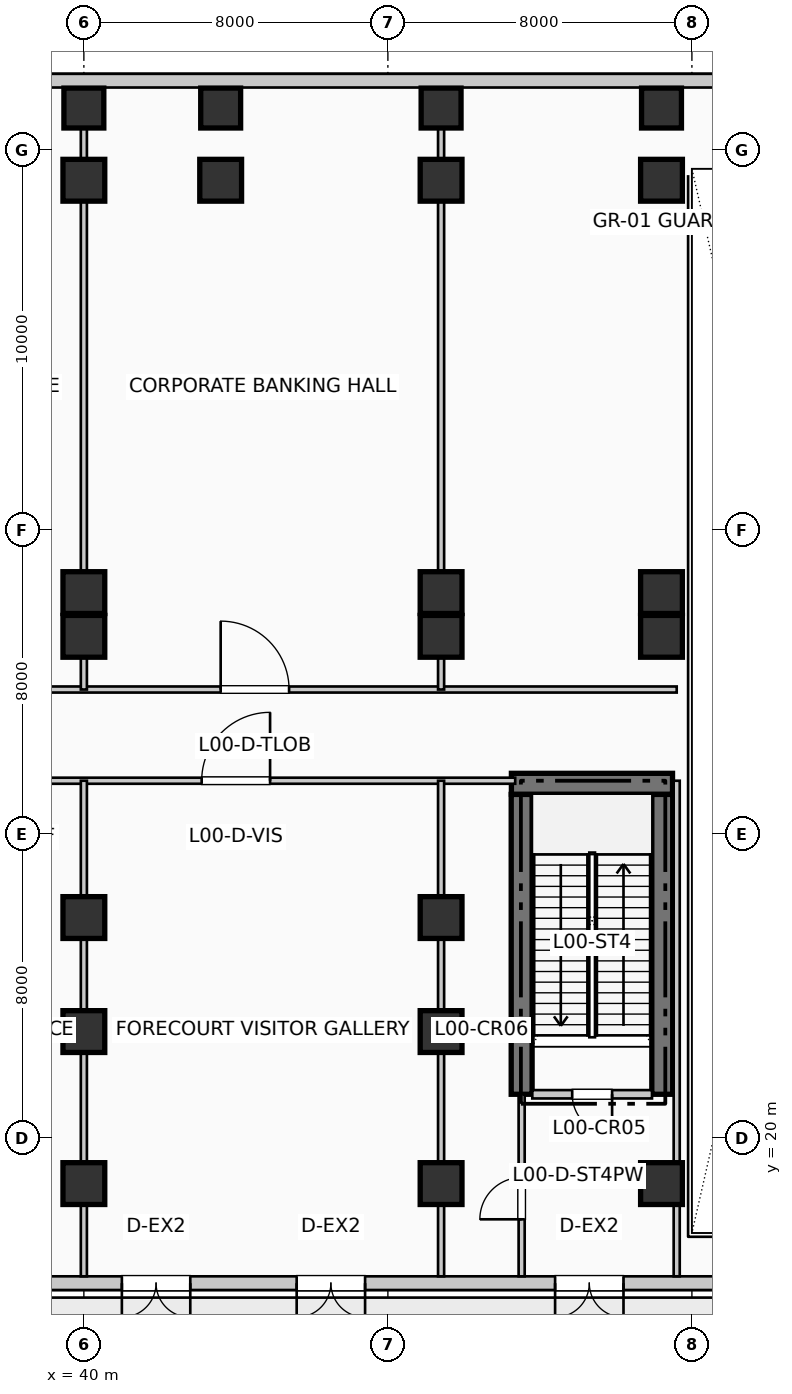
"""IFC4 building model, lengths in metres.
Left out: names, types, materials, properties, quantities, classifications, styles, units other than length and angle.
Written with IfcOpenShell. Run it as: python <this file> out.ifc"""

import sys

from ifc_helpers import new_model, si_unit, direction, frame, frame_2d, origin, origin_2d, place, context, subcontext, project, spatial, rectangle, extrude, element, fill, save


model = new_model("IFC4")
c1 = context("Model", 3, precision=1e-05, world=origin(), true_north=direction((0.0, 1.0)))
c2 = subcontext(c1, "Body", "Model", "MODEL_VIEW")
j1 = project(units=[si_unit("LENGTHUNIT", "METRE"), si_unit("PLANEANGLEUNIT", "RADIAN")], contexts=[c1])
p1 = place(None, origin())
s1 = spatial("IfcSite", under=j1, at=p1, CompositionType="ELEMENT")
p2 = place(p1, origin())
s2 = spatial("IfcBuilding", under=s1, at=p2, CompositionType="ELEMENT")
p3 = place(p2, origin())
s3 = spatial("IfcBuildingStorey", under=s2, at=p3, CompositionType="ELEMENT", Elevation=0.0)
for number, where, z_axis, x_axis in (
    (1, (51.52, 21.15, 0.0), (0.0, 0.0, 1.0), (0.0, 1.0, 0.0)),
    (2, (55.22, 21.15, 0.0), (0.0, 0.0, 1.0), (0.0, 1.0, 0.0)),
):
    element("IfcWall", number, at=place(p3, frame(where, z_axis=z_axis, x_axis=x_axis)), inside=s3, PredefinedType="SHEAR", context=c2, shape_type="SweptSolid", body=[
        extrude(rectangle(XDim=7.89, YDim=0.55, at=frame_2d((3.945, 0.0))), origin(), (0.0, 0.0, 1.0), 5.94),
    ])
p4 = place(p3, frame((51.25, 29.32, 0.0), z_axis=(0.0, 0.0, 1.0), x_axis=(1.0, 0.0, 0.0)))
e3 = element("IfcWall", 3, at=p4, inside=s3, PredefinedType="SHEAR", context=c2, shape_type="SweptSolid", body=[
    extrude(rectangle(XDim=4.24, YDim=0.55, at=frame_2d((2.12, 0.0))), origin(), (0.0, 0.0, 1.0), 5.94),
])
for number, where, z_axis, x_axis in (
    (4, (40.0, 18.8, 0.0), (0.0, 0.0, 1.0), (1.0, 0.0, 0.0)),
    (5, (40.0, 22.8, 0.0), (0.0, 0.0, 1.0), (1.0, 0.0, 0.0)),
    (6, (40.0, 25.8, 0.0), (0.0, 0.0, 1.0), (1.0, 0.0, 0.0)),
    (7, (40.0, 33.2, 0.0), (0.0, 0.0, 1.0), (1.0, 0.0, 0.0)),
    (8, (40.0, 34.35, 0.0), (0.0, 0.0, 1.0), (1.0, 0.0, 0.0)),
    (9, (40.0, 45.2, 0.0), (0.0, 0.0, 1.0), (1.0, 0.0, 0.0)),
):
    element("IfcColumn", number, at=place(p3, frame(where, z_axis=z_axis, x_axis=x_axis)), inside=s3, PredefinedType="COLUMN", context=c2, shape_type="SweptSolid", body=[
        extrude(rectangle(XDim=1.1, YDim=1.1, at=origin_2d()), origin(), (0.0, 0.0, 1.0), 5.94),
    ])
p5 = place(p3, frame((40.0, 47.1, 0.0), z_axis=(0.0, 0.0, 1.0), x_axis=(1.0, 0.0, 0.0)))
e10 = element("IfcColumn", 10, at=p5, inside=s3, PredefinedType="COLUMN", context=c2, shape_type="SweptSolid", body=[
    extrude(rectangle(XDim=1.05, YDim=1.05, at=origin_2d()), origin(), (0.0, 0.0, 1.0), 5.94),
])
p6 = place(p3, frame((43.6, 45.2, 0.0), z_axis=(0.0, 0.0, 1.0), x_axis=(1.0, 0.0, 0.0)))
e11 = element("IfcColumn", 11, at=p6, inside=s3, PredefinedType="COLUMN", context=c2, shape_type="SweptSolid", body=[
    extrude(rectangle(XDim=1.1, YDim=1.1, at=origin_2d()), origin(), (0.0, 0.0, 1.0), 5.94),
])
p7 = place(p3, frame((43.6, 47.1, 0.0), z_axis=(0.0, 0.0, 1.0), x_axis=(1.0, 0.0, 0.0)))
e12 = element("IfcColumn", 12, at=p7, inside=s3, PredefinedType="COLUMN", context=c2, shape_type="SweptSolid", body=[
    extrude(rectangle(XDim=1.05, YDim=1.05, at=origin_2d()), origin(), (0.0, 0.0, 1.0), 5.94),
])
for number, where, z_axis, x_axis in (
    (13, (49.4, 18.8, 0.0), (0.0, 0.0, 1.0), (1.0, 0.0, 0.0)),
    (14, (49.4, 22.8, 0.0), (0.0, 0.0, 1.0), (1.0, 0.0, 0.0)),
    (15, (49.4, 25.8, 0.0), (0.0, 0.0, 1.0), (1.0, 0.0, 0.0)),
    (16, (49.4, 33.2, 0.0), (0.0, 0.0, 1.0), (1.0, 0.0, 0.0)),
    (17, (49.4, 34.35, 0.0), (0.0, 0.0, 1.0), (1.0, 0.0, 0.0)),
    (18, (49.4, 45.2, 0.0), (0.0, 0.0, 1.0), (1.0, 0.0, 0.0)),
):
    element("IfcColumn", number, at=place(p3, frame(where, z_axis=z_axis, x_axis=x_axis)), inside=s3, PredefinedType="COLUMN", context=c2, shape_type="SweptSolid", body=[
        extrude(rectangle(XDim=1.1, YDim=1.1, at=origin_2d()), origin(), (0.0, 0.0, 1.0), 5.94),
    ])
p8 = place(p3, frame((49.4, 47.1, 0.0), z_axis=(0.0, 0.0, 1.0), x_axis=(1.0, 0.0, 0.0)))
e19 = element("IfcColumn", 19, at=p8, inside=s3, PredefinedType="COLUMN", context=c2, shape_type="SweptSolid", body=[
    extrude(rectangle(XDim=1.05, YDim=1.05, at=origin_2d()), origin(), (0.0, 0.0, 1.0), 5.94),
])
for number, where, z_axis, x_axis in (
    (20, (55.2, 18.8, 0.0), (0.0, 0.0, 1.0), (1.0, 0.0, 0.0)),
    (21, (55.2, 33.2, 0.0), (0.0, 0.0, 1.0), (1.0, 0.0, 0.0)),
    (22, (55.2, 34.35, 0.0), (0.0, 0.0, 1.0), (1.0, 0.0, 0.0)),
    (23, (55.2, 45.2, 0.0), (0.0, 0.0, 1.0), (1.0, 0.0, 0.0)),
):
    element("IfcColumn", number, at=place(p3, frame(where, z_axis=z_axis, x_axis=x_axis)), inside=s3, PredefinedType="COLUMN", context=c2, shape_type="SweptSolid", body=[
        extrude(rectangle(XDim=1.1, YDim=1.1, at=origin_2d()), origin(), (0.0, 0.0, 1.0), 5.94),
    ])
p9 = place(p3, frame((55.2, 47.1, 0.0), z_axis=(0.0, 0.0, 1.0), x_axis=(1.0, 0.0, 0.0)))
e24 = element("IfcColumn", 24, at=p9, inside=s3, PredefinedType="COLUMN", context=c2, shape_type="SweptSolid", body=[
    extrude(rectangle(XDim=1.05, YDim=1.05, at=origin_2d()), origin(), (0.0, 0.0, 1.0), 5.94),
])
p10 = place(p3, frame((38.055, 16.18, 0.0), z_axis=(0.0, 0.0, 1.0), x_axis=(1.0, 0.0, 0.0)))
e25 = element("IfcWall", 25, at=p10, inside=s3, PredefinedType="SOLIDWALL", context=c2, shape_type="SweptSolid", body=[
    extrude(rectangle(XDim=40.89, YDim=0.36, at=frame_2d((20.445, 0.0))), origin(), (0.0, 0.0, 1.0), 5.62),
])
p11 = place(p10, frame((4.745, 0.0, 0.0), z_axis=(0.0, 0.0, 1.0), x_axis=(-1.0, 0.0, 0.0)))
e26 = element("IfcOpeningElement", 26, at=p11, cuts=e25, PredefinedType="OPENING", context=c2, shape_type="SweptSolid", body=[
    extrude(rectangle(XDim=1.8, YDim=2.2, at=frame_2d((0.9, 1.1))), frame((0.0, 0.19, 0.0), z_axis=(0.0, -1.0, 0.0), x_axis=(1.0, 0.0, 0.0)), (0.0, 0.0, 1.0), 0.38),
])
p12 = place(p10, frame((9.345, 0.0, 0.0), z_axis=(0.0, 0.0, 1.0), x_axis=(-1.0, 0.0, 0.0)))
e27 = element("IfcOpeningElement", 27, at=p12, cuts=e25, PredefinedType="OPENING", context=c2, shape_type="SweptSolid", body=[
    extrude(rectangle(XDim=1.8, YDim=2.2, at=frame_2d((0.9, 1.1))), frame((0.0, 0.19, 0.0), z_axis=(0.0, -1.0, 0.0), x_axis=(1.0, 0.0, 0.0)), (0.0, 0.0, 1.0), 0.38),
])
p13 = place(p10, frame((16.145, 0.0, 0.0), z_axis=(0.0, 0.0, 1.0), x_axis=(-1.0, 0.0, 0.0)))
e28 = element("IfcOpeningElement", 28, at=p13, cuts=e25, PredefinedType="OPENING", context=c2, shape_type="SweptSolid", body=[
    extrude(rectangle(XDim=1.8, YDim=2.2, at=frame_2d((0.9, 1.1))), frame((0.0, 0.19, 0.0), z_axis=(0.0, -1.0, 0.0), x_axis=(1.0, 0.0, 0.0)), (0.0, 0.0, 1.0), 0.38),
])
p14 = place(p10, frame((32.0, 0.0, 0.0), z_axis=(0.0, 0.0, 1.0), x_axis=(-1.0, 0.0, 0.0)))
e29 = element("IfcOpeningElement", 29, at=p14, cuts=e25, PredefinedType="OPENING", context=c2, shape_type="SweptSolid", body=[
    extrude(rectangle(XDim=1.8, YDim=2.4, at=frame_2d((0.9, 1.2))), frame((0.0, 0.19, 0.0), z_axis=(0.0, -1.0, 0.0), x_axis=(1.0, 0.0, 0.0)), (0.0, 0.0, 1.0), 0.38),
])
p15 = place(p3, frame((78.945, 47.82, 0.0), z_axis=(0.0, 0.0, 1.0), x_axis=(-1.0, 0.0, 0.0)))
e30 = element("IfcWall", 30, at=p15, inside=s3, PredefinedType="SOLIDWALL", context=c2, shape_type="SweptSolid", body=[
    extrude(rectangle(XDim=77.89, YDim=0.36, at=frame_2d((38.945, 0.0))), origin(), (0.0, 0.0, 1.0), 5.62),
])
p16 = place(p15, frame((22.145, 0.0, 0.0), z_axis=(0.0, 0.0, 1.0), x_axis=(-1.0, 0.0, 0.0)))
e31 = element("IfcOpeningElement", 31, at=p16, cuts=e30, PredefinedType="OPENING", context=c2, shape_type="SweptSolid", body=[
    extrude(rectangle(XDim=4.8, YDim=2.6, at=frame_2d((2.4, 1.3))), frame((0.0, 0.19, 0.0), z_axis=(0.0, -1.0, 0.0), x_axis=(1.0, 0.0, 0.0)), (0.0, 0.0, 1.0), 0.38),
])
p17 = place(p15, frame((11.545, 0.0, 0.0), z_axis=(0.0, 0.0, 1.0), x_axis=(-1.0, 0.0, 0.0)))
e32 = element("IfcOpeningElement", 32, at=p17, cuts=e30, PredefinedType="OPENING", context=c2, shape_type="SweptSolid", body=[
    extrude(rectangle(XDim=4.0, YDim=3.2, at=frame_2d((2.0, 1.6))), frame((0.0, 0.19, 0.0), z_axis=(0.0, -1.0, 0.0), x_axis=(1.0, 0.0, 0.0)), (0.0, 0.0, 1.0), 0.38),
])
p18 = place(p15, frame((52.445, 0.0, 0.0), z_axis=(0.0, 0.0, 1.0), x_axis=(-1.0, 0.0, 0.0)))
e33 = element("IfcOpeningElement", 33, at=p18, cuts=e30, PredefinedType="OPENING", context=c2, shape_type="SweptSolid", body=[
    extrude(rectangle(XDim=1.8, YDim=2.4, at=frame_2d((0.9, 1.2))), frame((0.0, 0.19, 0.0), z_axis=(0.0, -1.0, 0.0), x_axis=(1.0, 0.0, 0.0)), (0.0, 0.0, 1.0), 0.38),
])
p19 = place(p3, frame((51.8, 21.15, 0.0), z_axis=(0.0, 0.0, 1.0), x_axis=(1.0, 0.0, 0.0)))
e34 = element("IfcWall", 34, at=p19, inside=s3, PredefinedType="PARTITIONING", context=c2, shape_type="SweptSolid", body=[
    extrude(rectangle(XDim=3.15, YDim=0.22, at=frame_2d((1.575, 0.0))), origin(), (0.0, 0.0, 1.0), 5.62),
])
p20 = place(p19, frame((2.1, 0.0, 0.0), z_axis=(0.0, 0.0, 1.0), x_axis=(-1.0, 0.0, 0.0)))
e35 = element("IfcOpeningElement", 35, at=p20, cuts=e34, PredefinedType="OPENING", context=c2, shape_type="SweptSolid", body=[
    extrude(rectangle(XDim=1.05, YDim=2.15, at=frame_2d((0.525, 1.075))), frame((0.0, 0.12, 0.0), z_axis=(0.0, -1.0, 0.0), x_axis=(1.0, 0.0, 0.0)), (0.0, 0.0, 1.0), 0.24),
])
p21 = place(p3, frame((51.52, 16.36, 0.0), z_axis=(0.0, 0.0, 1.0), x_axis=(0.0, 1.0, 0.0)))
e36 = element("IfcWall", 36, at=p21, inside=s3, PredefinedType="PARTITIONING", context=c2, shape_type="SweptSolid", body=[
    extrude(rectangle(XDim=4.79, YDim=0.16, at=frame_2d((2.395, 0.0))), origin(), (0.0, 0.0, 1.0), 5.62),
])
p22 = place(p21, frame((1.5, 0.0, 0.0)))
e37 = element("IfcOpeningElement", 37, at=p22, cuts=e36, PredefinedType="OPENING", context=c2, shape_type="SweptSolid", body=[
    extrude(rectangle(XDim=1.1, YDim=2.15, at=frame_2d((0.55, 1.075))), frame((0.0, 0.09, 0.0), z_axis=(0.0, -1.0, 0.0), x_axis=(1.0, 0.0, 0.0)), (0.0, 0.0, 1.0), 0.18),
])
p23 = place(p3, frame((55.6, 16.36, 0.0), z_axis=(0.0, 0.0, 1.0), x_axis=(0.0, 1.0, 0.0)))
e38 = element("IfcWall", 38, at=p23, inside=s3, PredefinedType="PARTITIONING", context=c2, shape_type="SweptSolid", body=[
    extrude(rectangle(XDim=13.04, YDim=0.16, at=frame_2d((6.52, 0.0))), origin(), (0.0, 0.0, 1.0), 4.805),
])
p24 = place(p3, frame((7.6, 29.4, 0.0), z_axis=(0.0, 0.0, 1.0), x_axis=(1.0, 0.0, 0.0)))
e39 = element("IfcWall", 39, at=p24, inside=s3, PredefinedType="PARTITIONING", context=c2, shape_type="SweptSolid", body=[
    extrude(rectangle(XDim=43.75, YDim=0.16, at=frame_2d((21.875, 0.0))), origin(), (0.0, 0.0, 1.0), 5.275),
])
p25 = place(p24, frame((3.5, 0.0, 0.0)))
e40 = element("IfcOpeningElement", 40, at=p25, cuts=e39, PredefinedType="OPENING", context=c2, shape_type="SweptSolid", body=[
    extrude(rectangle(XDim=1.8, YDim=2.3, at=frame_2d((0.9, 1.15))), frame((0.0, 0.09, 0.0), z_axis=(0.0, -1.0, 0.0), x_axis=(1.0, 0.0, 0.0)), (0.0, 0.0, 1.0), 0.18),
])
p26 = place(p24, frame((18.0, 0.0, 0.0)))
e41 = element("IfcOpeningElement", 41, at=p26, cuts=e39, PredefinedType="OPENING", context=c2, shape_type="SweptSolid", body=[
    extrude(rectangle(XDim=1.8, YDim=2.3, at=frame_2d((0.9, 1.15))), frame((0.0, 0.09, 0.0), z_axis=(0.0, -1.0, 0.0), x_axis=(1.0, 0.0, 0.0)), (0.0, 0.0, 1.0), 0.18),
])
p27 = place(p24, frame((29.5, 0.0, 0.0)))
e42 = element("IfcOpeningElement", 42, at=p27, cuts=e39, PredefinedType="OPENING", context=c2, shape_type="SweptSolid", body=[
    extrude(rectangle(XDim=0.95, YDim=2.15, at=frame_2d((0.475, 1.075))), frame((0.0, 0.09, 0.0), z_axis=(0.0, -1.0, 0.0), x_axis=(1.0, 0.0, 0.0)), (0.0, 0.0, 1.0), 0.18),
])
p28 = place(p24, frame((35.5, 0.0, 0.0)))
e43 = element("IfcOpeningElement", 43, at=p28, cuts=e39, PredefinedType="OPENING", context=c2, shape_type="SweptSolid", body=[
    extrude(rectangle(XDim=1.8, YDim=2.3, at=frame_2d((0.9, 1.15))), frame((0.0, 0.09, 0.0), z_axis=(0.0, -1.0, 0.0), x_axis=(1.0, 0.0, 0.0)), (0.0, 0.0, 1.0), 0.18),
])
for number, where, z_axis, x_axis in (
    (44, (40.0, 16.36, 0.0), (0.0, 0.0, 1.0), (0.0, 1.0, 0.0)),
    (45, (49.4, 16.36, 0.0), (0.0, 0.0, 1.0), (0.0, 1.0, 0.0)),
):
    element("IfcWall", number, at=place(p3, frame(where, z_axis=z_axis, x_axis=x_axis)), inside=s3, PredefinedType="PARTITIONING", context=c2, shape_type="SweptSolid", body=[
        extrude(rectangle(XDim=13.04, YDim=0.16, at=frame_2d((6.52, 0.0))), origin(), (0.0, 0.0, 1.0), 4.805),
    ])
p29 = place(p3, frame((23.6, 31.8, 0.0), z_axis=(0.0, 0.0, 1.0), x_axis=(1.0, 0.0, 0.0)))
e46 = element("IfcWall", 46, at=p29, inside=s3, PredefinedType="PARTITIONING", context=c2, shape_type="SweptSolid", body=[
    extrude(rectangle(XDim=32.0, YDim=0.16, at=frame_2d((16.0, 0.0))), origin(), (0.0, 0.0, 1.0), 5.62),
])
p30 = place(p29, frame((3.0, 0.0, 0.0)))
e47 = element("IfcOpeningElement", 47, at=p30, cuts=e46, PredefinedType="OPENING", context=c2, shape_type="SweptSolid", body=[
    extrude(rectangle(XDim=1.8, YDim=2.3, at=frame_2d((0.9, 1.15))), frame((0.0, 0.09, 0.0), z_axis=(0.0, -1.0, 0.0), x_axis=(1.0, 0.0, 0.0)), (0.0, 0.0, 1.0), 0.18),
])
p31 = place(p29, frame((9.5, 0.0, 0.0)))
e48 = element("IfcOpeningElement", 48, at=p31, cuts=e46, PredefinedType="OPENING", context=c2, shape_type="SweptSolid", body=[
    extrude(rectangle(XDim=0.95, YDim=2.15, at=frame_2d((0.475, 1.075))), frame((0.0, 0.09, 0.0), z_axis=(0.0, -1.0, 0.0), x_axis=(1.0, 0.0, 0.0)), (0.0, 0.0, 1.0), 0.18),
])
p32 = place(p29, frame((20.0, 0.0, 0.0)))
e49 = element("IfcOpeningElement", 49, at=p32, cuts=e46, PredefinedType="OPENING", context=c2, shape_type="SweptSolid", body=[
    extrude(rectangle(XDim=1.8, YDim=2.3, at=frame_2d((0.9, 1.15))), frame((0.0, 0.09, 0.0), z_axis=(0.0, -1.0, 0.0), x_axis=(1.0, 0.0, 0.0)), (0.0, 0.0, 1.0), 0.18),
])
for number, where, z_axis, x_axis in (
    (50, (40.0, 31.8, 0.0), (0.0, 0.0, 1.0), (0.0, 1.0, 0.0)),
    (51, (49.4, 31.8, 0.0), (0.0, 0.0, 1.0), (0.0, 1.0, 0.0)),
):
    element("IfcWall", number, at=place(p3, frame(where, z_axis=z_axis, x_axis=x_axis)), inside=s3, PredefinedType="PARTITIONING", context=c2, shape_type="SweptSolid", body=[
        extrude(rectangle(XDim=15.84, YDim=0.16, at=frame_2d((7.92, 0.0))), origin(), (0.0, 0.0, 1.0), 4.805),
    ])
p33 = place(p11, origin())
e52 = element("IfcDoor", 52, at=p33, inside=s3, OperationType="DOUBLE_DOOR_SINGLE_SWING", PredefinedType="DOOR", context=c2, shape_type="SweptSolid", body=[
    extrude(rectangle(XDim=1.8, YDim=2.2, at=frame_2d((0.9, 1.1))), frame((0.0, 0.025, 0.0), z_axis=(0.0, -1.0, 0.0), x_axis=(1.0, 0.0, 0.0)), (0.0, 0.0, 1.0), 0.05),
])
fill(e26, e52)
p34 = place(p12, origin())
e53 = element("IfcDoor", 53, at=p34, inside=s3, OperationType="DOUBLE_DOOR_SINGLE_SWING", PredefinedType="DOOR", context=c2, shape_type="SweptSolid", body=[
    extrude(rectangle(XDim=1.8, YDim=2.2, at=frame_2d((0.9, 1.1))), frame((0.0, 0.025, 0.0), z_axis=(0.0, -1.0, 0.0), x_axis=(1.0, 0.0, 0.0)), (0.0, 0.0, 1.0), 0.05),
])
fill(e27, e53)
p35 = place(p13, origin())
e54 = element("IfcDoor", 54, at=p35, inside=s3, OperationType="DOUBLE_DOOR_SINGLE_SWING", PredefinedType="DOOR", context=c2, shape_type="SweptSolid", body=[
    extrude(rectangle(XDim=1.8, YDim=2.2, at=frame_2d((0.9, 1.1))), frame((0.0, 0.025, 0.0), z_axis=(0.0, -1.0, 0.0), x_axis=(1.0, 0.0, 0.0)), (0.0, 0.0, 1.0), 0.05),
])
fill(e28, e54)
p36 = place(p20, origin())
e55 = element("IfcDoor", 55, at=p36, inside=s3, OperationType="SINGLE_SWING_RIGHT", PredefinedType="DOOR", context=c2, shape_type="SweptSolid", body=[
    extrude(rectangle(XDim=1.05, YDim=2.15, at=frame_2d((0.525, 1.075))), frame((0.0, 0.025, 0.0), z_axis=(0.0, -1.0, 0.0), x_axis=(1.0, 0.0, 0.0)), (0.0, 0.0, 1.0), 0.05),
])
fill(e35, e55)
p37 = place(p22, origin())
e56 = element("IfcDoor", 56, at=p37, inside=s3, OperationType="SINGLE_SWING_LEFT", PredefinedType="DOOR", context=c2, shape_type="SweptSolid", body=[
    extrude(rectangle(XDim=1.1, YDim=2.15, at=frame_2d((0.55, 1.075))), frame((0.0, 0.025, 0.0), z_axis=(0.0, -1.0, 0.0), x_axis=(1.0, 0.0, 0.0)), (0.0, 0.0, 1.0), 0.05),
])
fill(e37, e56)
p38 = place(p28, origin())
e57 = element("IfcDoor", 57, at=p38, inside=s3, OperationType="SINGLE_SWING_RIGHT", PredefinedType="DOOR", context=c2, shape_type="SweptSolid", body=[
    extrude(rectangle(XDim=1.8, YDim=2.3, at=frame_2d((0.9, 1.15))), frame((0.0, 0.025, 0.0), z_axis=(0.0, -1.0, 0.0), x_axis=(1.0, 0.0, 0.0)), (0.0, 0.0, 1.0), 0.05),
])
fill(e43, e57)
p39 = place(p32, origin())
e58 = element("IfcDoor", 58, at=p39, inside=s3, OperationType="SINGLE_SWING_LEFT", PredefinedType="DOOR", context=c2, shape_type="SweptSolid", body=[
    extrude(rectangle(XDim=1.8, YDim=2.3, at=frame_2d((0.9, 1.15))), frame((0.0, 0.025, 0.0), z_axis=(0.0, -1.0, 0.0), x_axis=(1.0, 0.0, 0.0)), (0.0, 0.0, 1.0), 0.05),
])
fill(e49, e58)
save(model, sys.argv[1])
